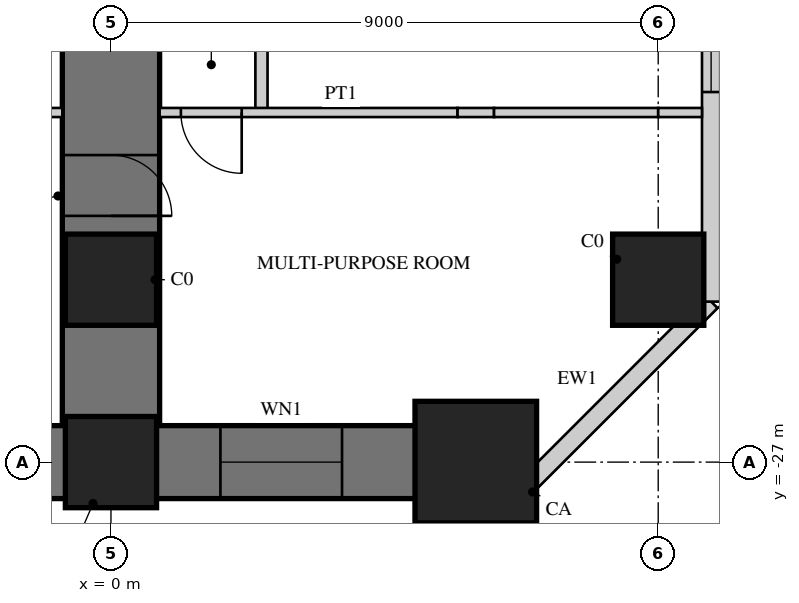
"""IFC4 building model, lengths in metres.
Left out: names, types, materials, properties, quantities, classifications, styles, units other than length and angle.
Written with IfcOpenShell. Run it as: python <this file> out.ifc"""

import sys

from ifc_helpers import new_model, si_unit, direction, frame, frame_2d, origin, origin_2d, place, context, subcontext, project, spatial, rectangle, hollow_rectangle, extrude, element, fill, save


model = new_model("IFC4")
c1 = context("Model", 3, precision=1e-05, world=origin(), true_north=direction((0.0, 1.0)))
c2 = subcontext(c1, "Body", "Model", "MODEL_VIEW")
j1 = project(units=[si_unit("LENGTHUNIT", "METRE"), si_unit("PLANEANGLEUNIT", "RADIAN")], contexts=[c1])
p1 = place(None, origin())
s1 = spatial("IfcSite", under=j1, at=p1, CompositionType="ELEMENT")
p2 = place(p1, origin())
s2 = spatial("IfcBuilding", under=s1, at=p2, CompositionType="ELEMENT")
p3 = place(p2, frame((0.0, 0.0, 14.0)))
s3 = spatial("IfcBuildingStorey", under=s2, at=p3, CompositionType="ELEMENT", Elevation=14.0)
p4 = place(p3, frame((0.0, -9.0, 0.0), z_axis=(0.0, 0.0, 1.0), x_axis=(0.0, -1.0, 0.0)))
e1 = element("IfcWall", 1, at=p4, inside=s3, PredefinedType="SHEAR", context=c2, shape_type="SweptSolid", body=[
    extrude(rectangle(XDim=18.0, YDim=1.6, at=frame_2d((9.0, 0.0))), origin(), (0.0, 0.0, 1.0), 4.5),
])
p5 = place(p4, frame((1.85, 0.0, 0.0)))
e2 = element("IfcOpeningElement", 2, at=p5, cuts=e1, PredefinedType="OPENING", context=c2, shape_type="SweptSolid", body=[
    extrude(rectangle(XDim=1.0, YDim=2.2, at=frame_2d((0.5, 1.1))), frame((0.0, 0.81, 0.0), z_axis=(0.0, -1.0, 0.0), x_axis=(1.0, 0.0, 0.0)), (0.0, 0.0, 1.0), 1.62),
])
p6 = place(p4, frame((7.2, 0.0, 0.0)))
e3 = element("IfcOpeningElement", 3, at=p6, cuts=e1, PredefinedType="OPENING", context=c2, shape_type="SweptSolid", body=[
    extrude(rectangle(XDim=1.0, YDim=2.2, at=frame_2d((0.5, 1.1))), frame((0.0, 0.81, 0.0), z_axis=(0.0, -1.0, 0.0), x_axis=(1.0, 0.0, 0.0)), (0.0, 0.0, 1.0), 1.62),
])
p7 = place(p4, frame((12.95, 0.0, 0.0)))
e4 = element("IfcOpeningElement", 4, at=p7, cuts=e1, PredefinedType="OPENING", context=c2, shape_type="SweptSolid", body=[
    extrude(rectangle(XDim=1.0, YDim=2.2, at=frame_2d((0.5, 1.1))), frame((0.0, 0.81, 0.0), z_axis=(0.0, -1.0, 0.0), x_axis=(1.0, 0.0, 0.0)), (0.0, 0.0, 1.0), 1.62),
])
p8 = place(p3, frame((-6.0, -27.0, 0.0), z_axis=(0.0, 0.0, 1.0), x_axis=(1.0, 0.0, 0.0)))
e5 = element("IfcWall", 5, at=p8, inside=s3, PredefinedType="SHEAR", context=c2, shape_type="SweptSolid", body=[
    extrude(rectangle(XDim=12.0, YDim=1.2, at=frame_2d((6.0, 0.0))), origin(), (0.0, 0.0, 1.0), 4.5),
])
p9 = place(p8, frame((2.2, 0.0, 0.9)))
e6 = element("IfcOpeningElement", 6, at=p9, cuts=e5, PredefinedType="OPENING", context=c2, shape_type="SweptSolid", body=[
    extrude(rectangle(XDim=2.0, YDim=1.8, at=frame_2d((1.0, 0.9))), frame((0.0, 0.61, 0.0), z_axis=(0.0, -1.0, 0.0), x_axis=(1.0, 0.0, 0.0)), (0.0, 0.0, 1.0), 1.22),
])
p10 = place(p8, frame((7.8, 0.0, 0.9)))
e7 = element("IfcOpeningElement", 7, at=p10, cuts=e5, PredefinedType="OPENING", context=c2, shape_type="SweptSolid", body=[
    extrude(rectangle(XDim=2.0, YDim=1.8, at=frame_2d((1.0, 0.9))), frame((0.0, 0.61, 0.0), z_axis=(0.0, -1.0, 0.0), x_axis=(1.0, 0.0, 0.0)), (0.0, 0.0, 1.0), 1.22),
])
for number, where, z_axis, x_axis in (
    (8, (9.0, -24.0, 0.0), (0.0, 0.0, 1.0), (1.0, 0.0, 0.0)),
    (9, (0.0, -27.0, 0.0), (0.0, 0.0, 1.0), (1.0, 0.0, 0.0)),
):
    element("IfcColumn", number, at=place(p3, frame(where, z_axis=z_axis, x_axis=x_axis)), inside=s3, PredefinedType="COLUMN", context=c2, shape_type="SweptSolid", body=[
        extrude(rectangle(XDim=1.5, YDim=1.5, at=origin_2d()), origin(), (0.0, 0.0, 1.0), 4.5),
    ])
p11 = place(p3, frame((6.0, -27.0, 0.0), z_axis=(0.0, 0.0, 1.0), x_axis=(1.0, 0.0, 0.0)))
e10 = element("IfcColumn", 10, at=p11, inside=s3, PredefinedType="COLUMN", context=c2, shape_type="SweptSolid", body=[
    extrude(rectangle(XDim=2.0, YDim=2.0, at=origin_2d()), origin(), (0.0, 0.0, 1.0), 4.5),
])
p12 = place(p3, frame((0.0, -24.0, 0.0), z_axis=(0.0, 0.0, 1.0), x_axis=(1.0, 0.0, 0.0)))
e11 = element("IfcColumn", 11, at=p12, inside=s3, PredefinedType="COLUMN", context=c2, shape_type="SweptSolid", body=[
    extrude(rectangle(XDim=1.5, YDim=1.5, at=origin_2d()), origin(), (0.0, 0.0, 1.0), 4.5),
])
p13 = place(p3, frame((6.63, -27.6, 0.0), z_axis=(0.0, 0.0, 1.0), x_axis=(0.707106781187, 0.707106781187, 0.0)))
e12 = element("IfcWall", 12, at=p13, inside=s3, PredefinedType="SOLIDWALL", context=c2, shape_type="SweptSolid", body=[
    extrude(rectangle(XDim=4.582, YDim=0.3, at=frame_2d((2.291, 0.0))), origin(), (0.0, 0.0, 1.0), 4.25),
])
p14 = place(p3, frame((9.87, -24.36, 0.0), z_axis=(0.0, 0.0, 1.0), x_axis=(0.0, 1.0, 0.0)))
e13 = element("IfcWall", 13, at=p14, inside=s3, PredefinedType="SOLIDWALL", context=c2, shape_type="SweptSolid", body=[
    extrude(rectangle(XDim=14.49, YDim=0.3, at=frame_2d((7.245, 0.0))), origin(), (0.0, 0.0, 1.0), 4.25),
])
p15 = place(p14, frame((6.9, 0.0, 0.0)))
e14 = element("IfcOpeningElement", 14, at=p15, cuts=e13, PredefinedType="OPENING", context=c2, shape_type="SweptSolid", body=[
    extrude(rectangle(XDim=1.0, YDim=2.4, at=frame_2d((0.5, 1.2))), frame((0.0, 0.16, 0.0), z_axis=(0.0, -1.0, 0.0), x_axis=(1.0, 0.0, 0.0)), (0.0, 0.0, 1.0), 0.32),
])
p16 = place(p14, frame((3.447, 0.0, 0.6)))
e15 = element("IfcOpeningElement", 15, at=p16, cuts=e13, PredefinedType="OPENING", context=c2, shape_type="SweptSolid", body=[
    extrude(rectangle(XDim=1.8, YDim=2.1, at=frame_2d((0.9, 1.05))), frame((0.0, 0.16, 0.0), z_axis=(0.0, -1.0, 0.0), x_axis=(1.0, 0.0, 0.0)), (0.0, 0.0, 1.0), 0.32),
])
p17 = place(p14, frame((12.141, 0.0, 0.6)))
e16 = element("IfcOpeningElement", 16, at=p17, cuts=e13, PredefinedType="OPENING", context=c2, shape_type="SweptSolid", body=[
    extrude(rectangle(XDim=1.8, YDim=2.1, at=frame_2d((0.9, 1.05))), frame((0.0, 0.16, 0.0), z_axis=(0.0, -1.0, 0.0), x_axis=(1.0, 0.0, 0.0)), (0.0, 0.0, 1.0), 0.32),
])
p18 = place(p3, frame((2.475, -9.65, 0.0), z_axis=(0.0, 0.0, 1.0), x_axis=(0.0, -1.0, 0.0)))
e17 = element("IfcWall", 17, at=p18, inside=s3, PredefinedType="SOLIDWALL", context=c2, shape_type="SweptSolid", body=[
    extrude(rectangle(XDim=11.6, YDim=0.2, at=frame_2d((5.8, 0.0))), origin(), (0.0, 0.0, 1.0), 4.25),
])
p19 = place(p18, frame((1.2, 0.0, 0.0)))
e18 = element("IfcOpeningElement", 18, at=p19, cuts=e17, PredefinedType="OPENING", context=c2, shape_type="SweptSolid", body=[
    extrude(rectangle(XDim=1.0, YDim=2.2, at=frame_2d((0.5, 1.1))), frame((0.0, 0.11, 0.0), z_axis=(0.0, -1.0, 0.0), x_axis=(1.0, 0.0, 0.0)), (0.0, 0.0, 1.0), 0.22),
])
p20 = place(p18, frame((3.6, 0.0, 0.0)))
e19 = element("IfcOpeningElement", 19, at=p20, cuts=e17, PredefinedType="OPENING", context=c2, shape_type="SweptSolid", body=[
    extrude(rectangle(XDim=1.0, YDim=2.2, at=frame_2d((0.5, 1.1))), frame((0.0, 0.11, 0.0), z_axis=(0.0, -1.0, 0.0), x_axis=(1.0, 0.0, 0.0)), (0.0, 0.0, 1.0), 0.22),
])
p21 = place(p18, frame((6.55, 0.0, 0.0)))
e20 = element("IfcOpeningElement", 20, at=p21, cuts=e17, PredefinedType="OPENING", context=c2, shape_type="SweptSolid", body=[
    extrude(rectangle(XDim=1.0, YDim=2.2, at=frame_2d((0.5, 1.1))), frame((0.0, 0.11, 0.0), z_axis=(0.0, -1.0, 0.0), x_axis=(1.0, 0.0, 0.0)), (0.0, 0.0, 1.0), 0.22),
])
p22 = place(p3, frame((-5.7, -21.25, 0.0), z_axis=(0.0, 0.0, 1.0), x_axis=(1.0, 0.0, 0.0)))
e21 = element("IfcWall", 21, at=p22, inside=s3, PredefinedType="PARTITIONING", context=c2, shape_type="SweptSolid", body=[
    extrude(rectangle(XDim=4.9, YDim=0.15, at=frame_2d((2.45, 0.0))), origin(), (0.0, 0.0, 1.0), 3.3),
])
p23 = place(p3, frame((0.8, -21.25, 0.0), z_axis=(0.0, 0.0, 1.0), x_axis=(1.0, 0.0, 0.0)))
e22 = element("IfcWall", 22, at=p23, inside=s3, PredefinedType="PARTITIONING", context=c2, shape_type="SweptSolid", body=[
    extrude(rectangle(XDim=4.9, YDim=0.15, at=frame_2d((2.45, 0.0))), origin(), (0.0, 0.0, 1.0), 3.3),
])
p24 = place(p23, frame((0.35, 0.0, 0.0)))
e23 = element("IfcOpeningElement", 23, at=p24, cuts=e22, PredefinedType="OPENING", context=c2, shape_type="SweptSolid", body=[
    extrude(rectangle(XDim=1.0, YDim=2.2, at=frame_2d((0.5, 1.1))), frame((0.0, 0.085, 0.0), z_axis=(0.0, -1.0, 0.0), x_axis=(1.0, 0.0, 0.0)), (0.0, 0.0, 1.0), 0.17),
])
p25 = place(p3, frame((5.7, -21.25, 0.0), z_axis=(0.0, 0.0, 1.0), x_axis=(1.0, 0.0, 0.0)))
e24 = element("IfcWall", 24, at=p25, inside=s3, PredefinedType="PARTITIONING", context=c2, shape_type="SweptSolid", body=[
    extrude(rectangle(XDim=0.6, YDim=0.15, at=frame_2d((0.3, 0.0))), origin(), (0.0, 0.0, 1.0), 4.25),
])
p26 = place(p3, frame((6.3, -21.25, 0.0), z_axis=(0.0, 0.0, 1.0), x_axis=(1.0, 0.0, 0.0)))
e25 = element("IfcWall", 25, at=p26, inside=s3, PredefinedType="PARTITIONING", context=c2, shape_type="SweptSolid", body=[
    extrude(rectangle(XDim=2.7, YDim=0.15, at=frame_2d((1.35, 0.0))), origin(), (0.0, 0.0, 1.0), 3.3),
])
p27 = place(p3, frame((9.0, -21.25, 0.0), z_axis=(0.0, 0.0, 1.0), x_axis=(1.0, 0.0, 0.0)))
e26 = element("IfcWall", 26, at=p27, inside=s3, PredefinedType="PARTITIONING", context=c2, shape_type="SweptSolid", body=[
    extrude(rectangle(XDim=0.72, YDim=0.15, at=frame_2d((0.36, 0.0))), origin(), (0.0, 0.0, 1.0), 4.25),
])
p28 = place(p10, origin())
e27 = element("IfcWindow", 27, at=p28, inside=s3, PartitioningType="SINGLE_PANEL", PredefinedType="WINDOW", context=c2, shape_type="SweptSolid", body=[
    extrude(hollow_rectangle(XDim=2.0, YDim=1.8, WallThickness=0.06, at=frame_2d((1.0, 0.9))), frame((0.0, 0.03, 0.0), z_axis=(0.0, -1.0, 0.0), x_axis=(1.0, 0.0, 0.0)), (0.0, 0.0, 1.0), 0.06),
    extrude(rectangle(XDim=1.879, YDim=1.679, at=frame_2d((1.0, 0.9))), frame((0.0, 0.03, 0.0), z_axis=(0.0, -1.0, 0.0), x_axis=(1.0, 0.0, 0.0)), (0.0, 0.0, 1.0), 0.06),
])
fill(e7, e27)
p29 = place(p16, origin())
e28 = element("IfcWindow", 28, at=p29, inside=s3, PartitioningType="SINGLE_PANEL", PredefinedType="WINDOW", context=c2, shape_type="SweptSolid", body=[
    extrude(hollow_rectangle(XDim=1.8, YDim=2.1, WallThickness=0.06, at=frame_2d((0.9, 1.05))), frame((0.0, 0.03, 0.0), z_axis=(0.0, -1.0, 0.0), x_axis=(1.0, 0.0, 0.0)), (0.0, 0.0, 1.0), 0.06),
    extrude(rectangle(XDim=1.679, YDim=1.979, at=frame_2d((0.9, 1.05))), frame((0.0, 0.03, 0.0), z_axis=(0.0, -1.0, 0.0), x_axis=(1.0, 0.0, 0.0)), (0.0, 0.0, 1.0), 0.06),
])
fill(e15, e28)
p30 = place(p24, frame((1.0, 0.0, 0.0), z_axis=(0.0, 0.0, 1.0), x_axis=(-1.0, 0.0, 0.0)))
e29 = element("IfcDoor", 29, at=p30, inside=s3, OperationType="SINGLE_SWING_LEFT", PredefinedType="DOOR", context=c2, shape_type="SweptSolid", body=[
    extrude(rectangle(XDim=1.0, YDim=2.2, at=frame_2d((0.5, 1.1))), frame((0.0, 0.025, 0.0), z_axis=(0.0, -1.0, 0.0), x_axis=(1.0, 0.0, 0.0)), (0.0, 0.0, 1.0), 0.05),
])
fill(e23, e29)
p31 = place(p7, origin())
e30 = element("IfcDoor", 30, at=p31, inside=s3, OperationType="SINGLE_SWING_RIGHT", PredefinedType="DOOR", context=c2, shape_type="SweptSolid", body=[
    extrude(rectangle(XDim=1.0, YDim=2.2, at=frame_2d((0.5, 1.1))), frame((0.0, 0.025, 0.0), z_axis=(0.0, -1.0, 0.0), x_axis=(1.0, 0.0, 0.0)), (0.0, 0.0, 1.0), 0.05),
])
fill(e4, e30)
save(model, sys.argv[1])
